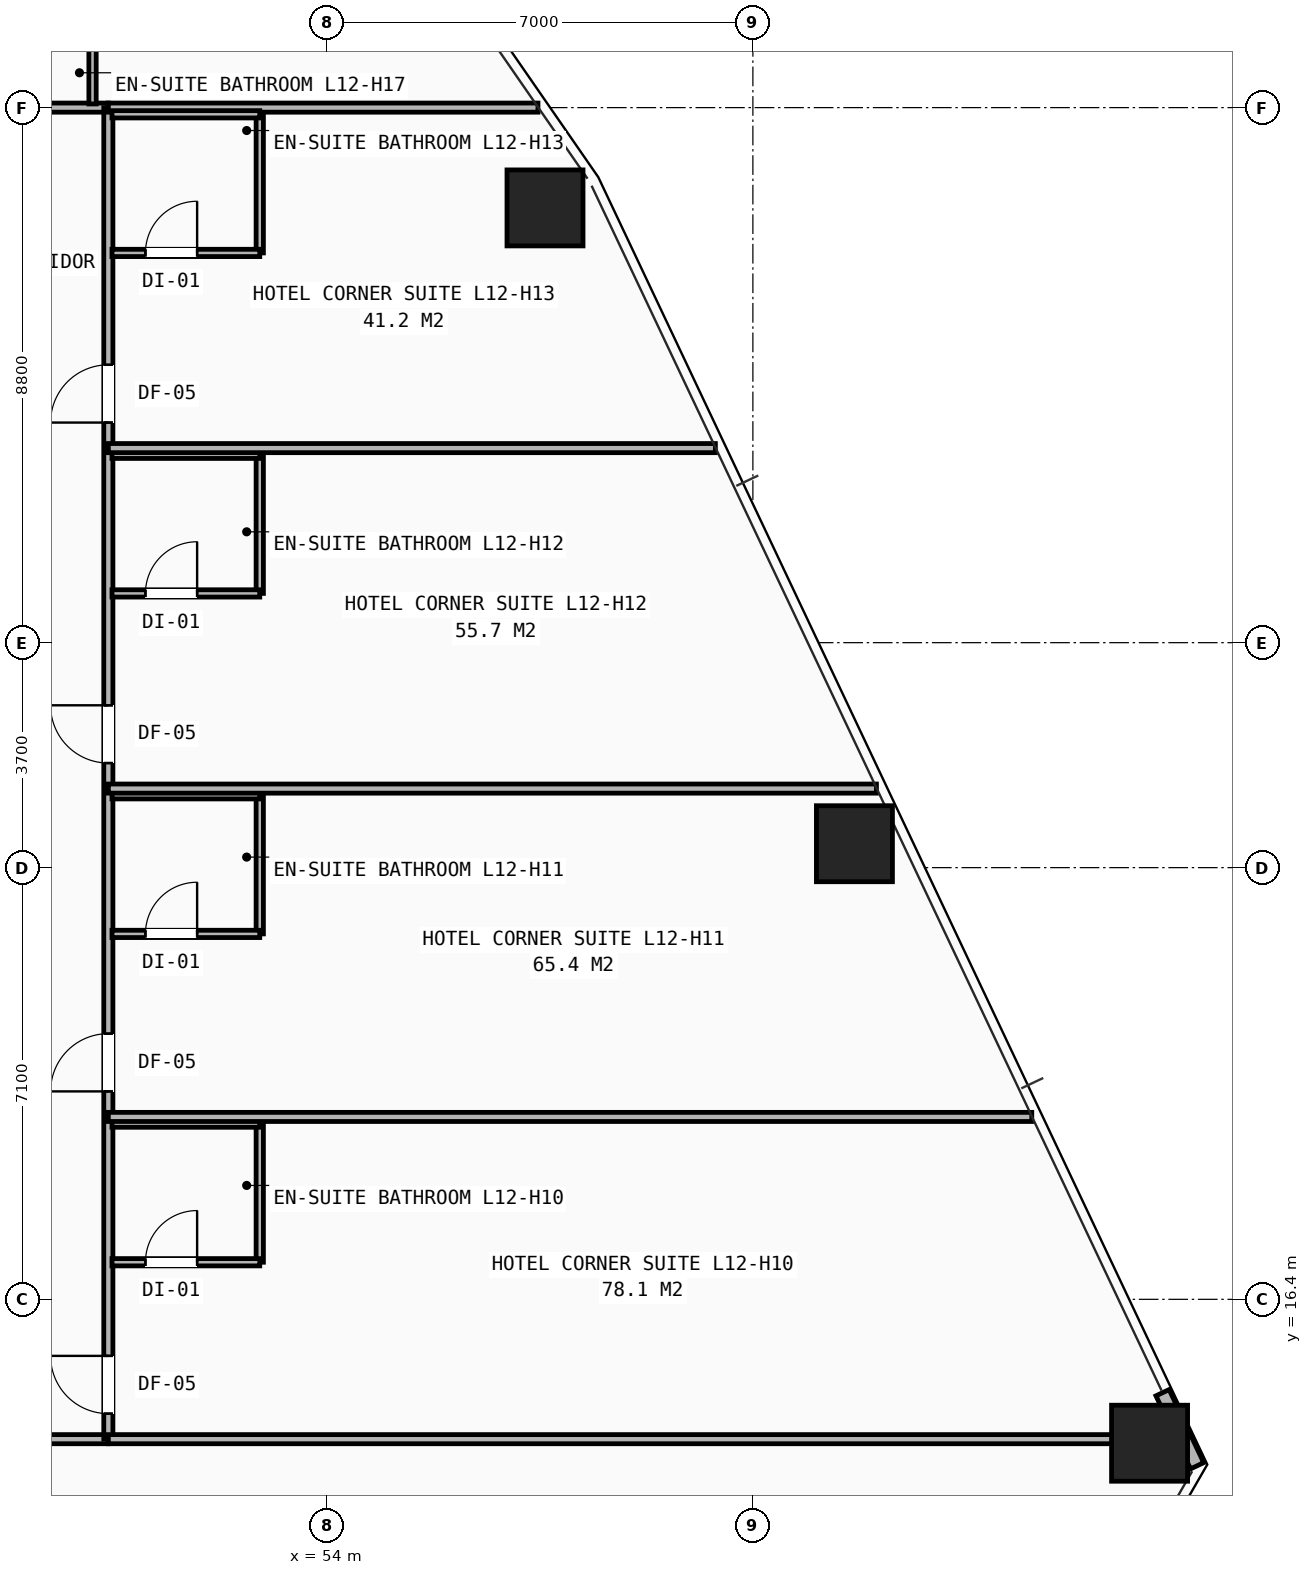
"""IFC4 building model, lengths in metres.
Left out: names, types, materials, properties, quantities, classifications, styles, units other than length and angle.
Written with IfcOpenShell. Run it as: python <this file> out.ifc"""

import sys

from ifc_helpers import new_model, si_unit, direction, frame, frame_2d, origin, origin_2d, place, context, subcontext, project, spatial, rectangle, hollow_rectangle, extrude, element, fill, save


model = new_model("IFC4")
c1 = context("Model", 3, precision=1e-05, world=origin(), true_north=direction((0.0, 1.0)))
c2 = subcontext(c1, "Body", "Model", "MODEL_VIEW")
j1 = project(units=[si_unit("LENGTHUNIT", "METRE"), si_unit("PLANEANGLEUNIT", "RADIAN")], contexts=[c1])
p1 = place(None, origin())
s1 = spatial("IfcSite", under=j1, at=p1, CompositionType="ELEMENT")
p2 = place(p1, origin())
s2 = spatial("IfcBuilding", under=s1, at=p2, CompositionType="ELEMENT")
p3 = place(p2, frame((0.0, 0.0, 46.4)))
s3 = spatial("IfcBuildingStorey", under=s2, at=p3, CompositionType="ELEMENT", Elevation=46.4)
for number, where, z_axis, x_axis in (
    (1, (67.524, 14.033, 0.0), (0.0, 0.0, 1.0), (1.0, 0.0, 0.0)),
    (2, (62.67, 23.893, 0.0), (0.0, 0.0, 1.0), (1.0, 0.0, 0.0)),
    (3, (57.581, 34.35, 0.0), (0.0, 0.0, 1.0), (1.0, 0.0, 0.0)),
):
    element("IfcColumn", number, at=place(p3, frame(where, z_axis=z_axis, x_axis=x_axis)), inside=s3, PredefinedType="COLUMN", context=c2, shape_type="SweptSolid", body=[
        extrude(hollow_rectangle(XDim=1.25, YDim=1.25, WallThickness=0.08, at=origin_2d()), origin(), (0.0, 0.0, 1.0), 3.2),
    ])
p4 = place(p3, frame((68.306, 13.662, 0.0), z_axis=(0.0, 0.0, 1.0), x_axis=(-0.427644283084, 0.903947104175, 0.0)))
e4 = element("IfcWall", 4, at=p4, inside=s3, PredefinedType="SHEAR", context=c2, shape_type="SweptSolid", body=[
    extrude(rectangle(XDim=1.33, YDim=0.24, at=frame_2d((0.665, 0.0))), origin(), (0.0, 0.0, 1.0), 2.263),
])
p5 = place(p3, frame((29.6, 14.1, 0.0), z_axis=(0.0, 0.0, 1.0), x_axis=(1.0, 0.0, 0.0)))
e5 = element("IfcWall", 5, at=p5, inside=s3, PredefinedType="PARTITIONING", context=c2, shape_type="SweptSolid", body=[
    extrude(rectangle(XDim=20.8, YDim=0.15, at=frame_2d((10.4, 0.0))), origin(), (0.0, 0.0, 1.0), 2.431),
])
p6 = place(p5, frame((0.57, 0.0, 0.0)))
e6 = element("IfcOpeningElement", 6, at=p6, cuts=e5, PredefinedType="OPENING", context=c2, shape_type="SweptSolid", body=[
    extrude(rectangle(XDim=0.95, YDim=2.1, at=frame_2d((0.475, 1.05))), frame((0.0, 0.085, 0.0), z_axis=(0.0, -1.0, 0.0), x_axis=(1.0, 0.0, 0.0)), (0.0, 0.0, 1.0), 0.17),
])
p7 = place(p5, frame((4.22, 0.0, 0.0)))
e7 = element("IfcOpeningElement", 7, at=p7, cuts=e5, PredefinedType="OPENING", context=c2, shape_type="SweptSolid", body=[
    extrude(rectangle(XDim=0.95, YDim=2.1, at=frame_2d((0.475, 1.05))), frame((0.0, 0.085, 0.0), z_axis=(0.0, -1.0, 0.0), x_axis=(1.0, 0.0, 0.0)), (0.0, 0.0, 1.0), 0.17),
])
p8 = place(p5, frame((8.42, 0.0, 0.0)))
e8 = element("IfcOpeningElement", 8, at=p8, cuts=e5, PredefinedType="OPENING", context=c2, shape_type="SweptSolid", body=[
    extrude(rectangle(XDim=0.95, YDim=2.1, at=frame_2d((0.475, 1.05))), frame((0.0, 0.085, 0.0), z_axis=(0.0, -1.0, 0.0), x_axis=(1.0, 0.0, 0.0)), (0.0, 0.0, 1.0), 0.17),
])
p9 = place(p5, frame((12.62, 0.0, 0.0)))
e9 = element("IfcOpeningElement", 9, at=p9, cuts=e5, PredefinedType="OPENING", context=c2, shape_type="SweptSolid", body=[
    extrude(rectangle(XDim=0.95, YDim=2.1, at=frame_2d((0.475, 1.05))), frame((0.0, 0.085, 0.0), z_axis=(0.0, -1.0, 0.0), x_axis=(1.0, 0.0, 0.0)), (0.0, 0.0, 1.0), 0.17),
])
p10 = place(p5, frame((17.02, 0.0, 0.0)))
e10 = element("IfcOpeningElement", 10, at=p10, cuts=e5, PredefinedType="OPENING", context=c2, shape_type="SweptSolid", body=[
    extrude(rectangle(XDim=0.95, YDim=2.1, at=frame_2d((0.475, 1.05))), frame((0.0, 0.085, 0.0), z_axis=(0.0, -1.0, 0.0), x_axis=(1.0, 0.0, 0.0)), (0.0, 0.0, 1.0), 0.17),
])
p11 = place(p3, frame((41.275, 36.0, 0.0), z_axis=(0.0, 0.0, 1.0), x_axis=(1.0, 0.0, 0.0)))
e11 = element("IfcWall", 11, at=p11, inside=s3, PredefinedType="PARTITIONING", context=c2, shape_type="SweptSolid", body=[
    extrude(rectangle(XDim=9.125, YDim=0.15, at=frame_2d((4.562, 0.0))), origin(), (0.0, 0.0, 1.0), 2.513),
])
p12 = place(p11, frame((0.2, 0.0, 0.0)))
e12 = element("IfcOpeningElement", 12, at=p12, cuts=e11, PredefinedType="OPENING", context=c2, shape_type="SweptSolid", body=[
    extrude(rectangle(XDim=0.95, YDim=2.1, at=frame_2d((0.475, 1.05))), frame((0.0, 0.085, 0.0), z_axis=(0.0, -1.0, 0.0), x_axis=(1.0, 0.0, 0.0)), (0.0, 0.0, 1.0), 0.17),
])
p13 = place(p11, frame((4.345, 0.0, 0.0)))
e13 = element("IfcOpeningElement", 13, at=p13, cuts=e11, PredefinedType="OPENING", context=c2, shape_type="SweptSolid", body=[
    extrude(rectangle(XDim=0.95, YDim=2.1, at=frame_2d((0.475, 1.05))), frame((0.0, 0.085, 0.0), z_axis=(0.0, -1.0, 0.0), x_axis=(1.0, 0.0, 0.0)), (0.0, 0.0, 1.0), 0.17),
])
p14 = place(p3, frame((50.4, 14.1, 0.0), z_axis=(0.0, 0.0, 1.0), x_axis=(0.0, 1.0, 0.0)))
e14 = element("IfcWall", 14, at=p14, inside=s3, PredefinedType="PARTITIONING", context=c2, shape_type="SweptSolid", body=[
    extrude(rectangle(XDim=21.9, YDim=0.15, at=frame_2d((10.95, 0.0))), origin(), (0.0, 0.0, 1.0), 2.431),
])
p15 = place(p14, frame((0.42, 0.0, 0.0)))
e15 = element("IfcOpeningElement", 15, at=p15, cuts=e14, PredefinedType="OPENING", context=c2, shape_type="SweptSolid", body=[
    extrude(rectangle(XDim=0.95, YDim=2.1, at=frame_2d((0.475, 1.05))), frame((0.0, 0.085, 0.0), z_axis=(0.0, -1.0, 0.0), x_axis=(1.0, 0.0, 0.0)), (0.0, 0.0, 1.0), 0.17),
])
p16 = place(p14, frame((5.72, 0.0, 0.0)))
e16 = element("IfcOpeningElement", 16, at=p16, cuts=e14, PredefinedType="OPENING", context=c2, shape_type="SweptSolid", body=[
    extrude(rectangle(XDim=0.95, YDim=2.1, at=frame_2d((0.475, 1.05))), frame((0.0, 0.085, 0.0), z_axis=(0.0, -1.0, 0.0), x_axis=(1.0, 0.0, 0.0)), (0.0, 0.0, 1.0), 0.17),
])
p17 = place(p14, frame((11.12, 0.0, 0.0)))
e17 = element("IfcOpeningElement", 17, at=p17, cuts=e14, PredefinedType="OPENING", context=c2, shape_type="SweptSolid", body=[
    extrude(rectangle(XDim=0.95, YDim=2.1, at=frame_2d((0.475, 1.05))), frame((0.0, 0.085, 0.0), z_axis=(0.0, -1.0, 0.0), x_axis=(1.0, 0.0, 0.0)), (0.0, 0.0, 1.0), 0.17),
])
p18 = place(p14, frame((16.72, 0.0, 0.0)))
e18 = element("IfcOpeningElement", 18, at=p18, cuts=e14, PredefinedType="OPENING", context=c2, shape_type="SweptSolid", body=[
    extrude(rectangle(XDim=0.95, YDim=2.1, at=frame_2d((0.475, 1.05))), frame((0.0, 0.085, 0.0), z_axis=(0.0, -1.0, 0.0), x_axis=(1.0, 0.0, 0.0)), (0.0, 0.0, 1.0), 0.17),
])
p19 = place(p3, frame((50.4, 14.1, 0.0), z_axis=(0.0, 0.0, 1.0), x_axis=(1.0, 0.0, 0.0)))
e19 = element("IfcWall", 19, at=p19, inside=s3, PredefinedType="PARTITIONING", context=c2, shape_type="SweptSolid", body=[
    extrude(rectangle(XDim=17.694, YDim=0.15, at=frame_2d((8.847, 0.0))), origin(), (0.0, 0.0, 1.0), 2.268),
])
p20 = place(p3, frame((50.4, 36.0, 0.0), z_axis=(0.0, 0.0, 1.0), x_axis=(1.0, 0.0, 0.0)))
e20 = element("IfcWall", 20, at=p20, inside=s3, PredefinedType="PARTITIONING", context=c2, shape_type="SweptSolid", body=[
    extrude(rectangle(XDim=7.065, YDim=0.15, at=frame_2d((3.533, 0.0))), origin(), (0.0, 0.0, 1.0), 2.268),
])
p21 = place(p3, frame((52.89, 17.01, 0.0), z_axis=(0.0, 0.0, 1.0), x_axis=(0.0, 1.0, 0.0)))
e21 = element("IfcWall", 21, at=p21, inside=s3, PredefinedType="PARTITIONING", context=c2, shape_type="SweptSolid", body=[
    extrude(rectangle(XDim=2.28, YDim=0.12, at=frame_2d((1.14, 0.0))), origin(), (0.0, 0.0, 1.0), 2.98),
])
p22 = place(p3, frame((50.46, 17.01, 0.0), z_axis=(0.0, 0.0, 1.0), x_axis=(1.0, 0.0, 0.0)))
e22 = element("IfcWall", 22, at=p22, inside=s3, PredefinedType="PARTITIONING", context=c2, shape_type="SweptSolid", body=[
    extrude(rectangle(XDim=2.43, YDim=0.12, at=frame_2d((1.215, 0.0))), origin(), (0.0, 0.0, 1.0), 2.98),
])
p23 = place(p22, frame((0.55, 0.0, 0.0)))
e23 = element("IfcOpeningElement", 23, at=p23, cuts=e22, PredefinedType="OPENING", context=c2, shape_type="SweptSolid", body=[
    extrude(rectangle(XDim=0.85, YDim=2.05, at=frame_2d((0.425, 1.025))), frame((0.0, 0.07, 0.0), z_axis=(0.0, -1.0, 0.0), x_axis=(1.0, 0.0, 0.0)), (0.0, 0.0, 1.0), 0.14),
])
p24 = place(p3, frame((50.46, 19.29, 0.0), z_axis=(0.0, 0.0, 1.0), x_axis=(1.0, 0.0, 0.0)))
e24 = element("IfcWall", 24, at=p24, inside=s3, PredefinedType="PARTITIONING", context=c2, shape_type="SweptSolid", body=[
    extrude(rectangle(XDim=2.43, YDim=0.12, at=frame_2d((1.215, 0.0))), origin(), (0.0, 0.0, 1.0), 2.98),
])
p25 = place(p3, frame((50.4, 19.4, 0.0), z_axis=(0.0, 0.0, 1.0), x_axis=(1.0, 0.0, 0.0)))
e25 = element("IfcWall", 25, at=p25, inside=s3, PredefinedType="PARTITIONING", context=c2, shape_type="SweptSolid", body=[
    extrude(rectangle(XDim=15.186, YDim=0.15, at=frame_2d((7.593, 0.0))), origin(), (0.0, 0.0, 1.0), 2.268),
])
p26 = place(p3, frame((52.89, 22.41, 0.0), z_axis=(0.0, 0.0, 1.0), x_axis=(0.0, 1.0, 0.0)))
e26 = element("IfcWall", 26, at=p26, inside=s3, PredefinedType="PARTITIONING", context=c2, shape_type="SweptSolid", body=[
    extrude(rectangle(XDim=2.28, YDim=0.12, at=frame_2d((1.14, 0.0))), origin(), (0.0, 0.0, 1.0), 2.98),
])
p27 = place(p3, frame((50.46, 22.41, 0.0), z_axis=(0.0, 0.0, 1.0), x_axis=(1.0, 0.0, 0.0)))
e27 = element("IfcWall", 27, at=p27, inside=s3, PredefinedType="PARTITIONING", context=c2, shape_type="SweptSolid", body=[
    extrude(rectangle(XDim=2.43, YDim=0.12, at=frame_2d((1.215, 0.0))), origin(), (0.0, 0.0, 1.0), 2.98),
])
p28 = place(p27, frame((0.55, 0.0, 0.0)))
e28 = element("IfcOpeningElement", 28, at=p28, cuts=e27, PredefinedType="OPENING", context=c2, shape_type="SweptSolid", body=[
    extrude(rectangle(XDim=0.85, YDim=2.05, at=frame_2d((0.425, 1.025))), frame((0.0, 0.07, 0.0), z_axis=(0.0, -1.0, 0.0), x_axis=(1.0, 0.0, 0.0)), (0.0, 0.0, 1.0), 0.14),
])
p29 = place(p3, frame((50.46, 24.69, 0.0), z_axis=(0.0, 0.0, 1.0), x_axis=(1.0, 0.0, 0.0)))
e29 = element("IfcWall", 29, at=p29, inside=s3, PredefinedType="PARTITIONING", context=c2, shape_type="SweptSolid", body=[
    extrude(rectangle(XDim=2.43, YDim=0.12, at=frame_2d((1.215, 0.0))), origin(), (0.0, 0.0, 1.0), 2.98),
])
p30 = place(p3, frame((50.4, 24.8, 0.0), z_axis=(0.0, 0.0, 1.0), x_axis=(1.0, 0.0, 0.0)))
e30 = element("IfcWall", 30, at=p30, inside=s3, PredefinedType="PARTITIONING", context=c2, shape_type="SweptSolid", body=[
    extrude(rectangle(XDim=12.632, YDim=0.15, at=frame_2d((6.316, 0.0))), origin(), (0.0, 0.0, 1.0), 2.268),
])
p31 = place(p3, frame((52.89, 28.01, 0.0), z_axis=(0.0, 0.0, 1.0), x_axis=(0.0, 1.0, 0.0)))
e31 = element("IfcWall", 31, at=p31, inside=s3, PredefinedType="PARTITIONING", context=c2, shape_type="SweptSolid", body=[
    extrude(rectangle(XDim=2.28, YDim=0.12, at=frame_2d((1.14, 0.0))), origin(), (0.0, 0.0, 1.0), 2.98),
])
p32 = place(p3, frame((50.46, 28.01, 0.0), z_axis=(0.0, 0.0, 1.0), x_axis=(1.0, 0.0, 0.0)))
e32 = element("IfcWall", 32, at=p32, inside=s3, PredefinedType="PARTITIONING", context=c2, shape_type="SweptSolid", body=[
    extrude(rectangle(XDim=2.43, YDim=0.12, at=frame_2d((1.215, 0.0))), origin(), (0.0, 0.0, 1.0), 2.98),
])
p33 = place(p32, frame((0.55, 0.0, 0.0)))
e33 = element("IfcOpeningElement", 33, at=p33, cuts=e32, PredefinedType="OPENING", context=c2, shape_type="SweptSolid", body=[
    extrude(rectangle(XDim=0.85, YDim=2.05, at=frame_2d((0.425, 1.025))), frame((0.0, 0.07, 0.0), z_axis=(0.0, -1.0, 0.0), x_axis=(1.0, 0.0, 0.0)), (0.0, 0.0, 1.0), 0.14),
])
p34 = place(p3, frame((50.46, 30.29, 0.0), z_axis=(0.0, 0.0, 1.0), x_axis=(1.0, 0.0, 0.0)))
e34 = element("IfcWall", 34, at=p34, inside=s3, PredefinedType="PARTITIONING", context=c2, shape_type="SweptSolid", body=[
    extrude(rectangle(XDim=2.43, YDim=0.12, at=frame_2d((1.215, 0.0))), origin(), (0.0, 0.0, 1.0), 2.98),
])
p35 = place(p3, frame((50.4, 30.4, 0.0), z_axis=(0.0, 0.0, 1.0), x_axis=(1.0, 0.0, 0.0)))
e35 = element("IfcWall", 35, at=p35, inside=s3, PredefinedType="PARTITIONING", context=c2, shape_type="SweptSolid", body=[
    extrude(rectangle(XDim=9.983, YDim=0.15, at=frame_2d((4.992, 0.0))), origin(), (0.0, 0.0, 1.0), 2.268),
])
p36 = place(p3, frame((52.89, 33.61, 0.0), z_axis=(0.0, 0.0, 1.0), x_axis=(0.0, 1.0, 0.0)))
e36 = element("IfcWall", 36, at=p36, inside=s3, PredefinedType="PARTITIONING", context=c2, shape_type="SweptSolid", body=[
    extrude(rectangle(XDim=2.28, YDim=0.12, at=frame_2d((1.14, 0.0))), origin(), (0.0, 0.0, 1.0), 2.98),
])
p37 = place(p3, frame((50.46, 33.61, 0.0), z_axis=(0.0, 0.0, 1.0), x_axis=(1.0, 0.0, 0.0)))
e37 = element("IfcWall", 37, at=p37, inside=s3, PredefinedType="PARTITIONING", context=c2, shape_type="SweptSolid", body=[
    extrude(rectangle(XDim=2.43, YDim=0.12, at=frame_2d((1.215, 0.0))), origin(), (0.0, 0.0, 1.0), 2.513),
])
p38 = place(p37, frame((0.55, 0.0, 0.0)))
e38 = element("IfcOpeningElement", 38, at=p38, cuts=e37, PredefinedType="OPENING", context=c2, shape_type="SweptSolid", body=[
    extrude(rectangle(XDim=0.85, YDim=2.05, at=frame_2d((0.425, 1.025))), frame((0.0, 0.07, 0.0), z_axis=(0.0, -1.0, 0.0), x_axis=(1.0, 0.0, 0.0)), (0.0, 0.0, 1.0), 0.14),
])
for number, where, z_axis, x_axis in (
    (39, (50.46, 35.89, 0.0), (0.0, 0.0, 1.0), (1.0, 0.0, 0.0)),
    (40, (50.14, 36.06, 0.0), (0.0, 0.0, 1.0), (0.0, 1.0, 0.0)),
):
    element("IfcWall", number, at=place(p3, frame(where, z_axis=z_axis, x_axis=x_axis)), inside=s3, PredefinedType="PARTITIONING", context=c2, shape_type="SweptSolid", body=[
        extrude(rectangle(XDim=2.43, YDim=0.12, at=frame_2d((1.215, 0.0))), origin(), (0.0, 0.0, 1.0), 2.513),
    ])
p39 = place(p15, origin())
e41 = element("IfcDoor", 41, at=p39, inside=s3, OperationType="SINGLE_SWING_RIGHT", PredefinedType="DOOR", context=c2, shape_type="SweptSolid", body=[
    extrude(rectangle(XDim=0.95, YDim=2.1, at=frame_2d((0.475, 1.05))), frame((0.0, 0.025, 0.0), z_axis=(0.0, -1.0, 0.0), x_axis=(1.0, 0.0, 0.0)), (0.0, 0.0, 1.0), 0.05),
])
fill(e15, e41)
p40 = place(p23, origin())
e42 = element("IfcDoor", 42, at=p40, inside=s3, OperationType="SINGLE_SWING_RIGHT", PredefinedType="DOOR", context=c2, shape_type="SweptSolid", body=[
    extrude(rectangle(XDim=0.85, YDim=2.05, at=frame_2d((0.425, 1.025))), frame((0.0, 0.025, 0.0), z_axis=(0.0, -1.0, 0.0), x_axis=(1.0, 0.0, 0.0)), (0.0, 0.0, 1.0), 0.05),
])
fill(e23, e42)
p41 = place(p16, origin())
e43 = element("IfcDoor", 43, at=p41, inside=s3, OperationType="SINGLE_SWING_LEFT", PredefinedType="DOOR", context=c2, shape_type="SweptSolid", body=[
    extrude(rectangle(XDim=0.95, YDim=2.1, at=frame_2d((0.475, 1.05))), frame((0.0, 0.025, 0.0), z_axis=(0.0, -1.0, 0.0), x_axis=(1.0, 0.0, 0.0)), (0.0, 0.0, 1.0), 0.05),
])
fill(e16, e43)
p42 = place(p28, origin())
e44 = element("IfcDoor", 44, at=p42, inside=s3, OperationType="SINGLE_SWING_RIGHT", PredefinedType="DOOR", context=c2, shape_type="SweptSolid", body=[
    extrude(rectangle(XDim=0.85, YDim=2.05, at=frame_2d((0.425, 1.025))), frame((0.0, 0.025, 0.0), z_axis=(0.0, -1.0, 0.0), x_axis=(1.0, 0.0, 0.0)), (0.0, 0.0, 1.0), 0.05),
])
fill(e28, e44)
p43 = place(p17, origin())
e45 = element("IfcDoor", 45, at=p43, inside=s3, OperationType="SINGLE_SWING_RIGHT", PredefinedType="DOOR", context=c2, shape_type="SweptSolid", body=[
    extrude(rectangle(XDim=0.95, YDim=2.1, at=frame_2d((0.475, 1.05))), frame((0.0, 0.025, 0.0), z_axis=(0.0, -1.0, 0.0), x_axis=(1.0, 0.0, 0.0)), (0.0, 0.0, 1.0), 0.05),
])
fill(e17, e45)
p44 = place(p33, origin())
e46 = element("IfcDoor", 46, at=p44, inside=s3, OperationType="SINGLE_SWING_RIGHT", PredefinedType="DOOR", context=c2, shape_type="SweptSolid", body=[
    extrude(rectangle(XDim=0.85, YDim=2.05, at=frame_2d((0.425, 1.025))), frame((0.0, 0.025, 0.0), z_axis=(0.0, -1.0, 0.0), x_axis=(1.0, 0.0, 0.0)), (0.0, 0.0, 1.0), 0.05),
])
fill(e33, e46)
p45 = place(p18, origin())
e47 = element("IfcDoor", 47, at=p45, inside=s3, OperationType="SINGLE_SWING_LEFT", PredefinedType="DOOR", context=c2, shape_type="SweptSolid", body=[
    extrude(rectangle(XDim=0.95, YDim=2.1, at=frame_2d((0.475, 1.05))), frame((0.0, 0.025, 0.0), z_axis=(0.0, -1.0, 0.0), x_axis=(1.0, 0.0, 0.0)), (0.0, 0.0, 1.0), 0.05),
])
fill(e18, e47)
p46 = place(p38, origin())
e48 = element("IfcDoor", 48, at=p46, inside=s3, OperationType="SINGLE_SWING_RIGHT", PredefinedType="DOOR", context=c2, shape_type="SweptSolid", body=[
    extrude(rectangle(XDim=0.85, YDim=2.05, at=frame_2d((0.425, 1.025))), frame((0.0, 0.025, 0.0), z_axis=(0.0, -1.0, 0.0), x_axis=(1.0, 0.0, 0.0)), (0.0, 0.0, 1.0), 0.05),
])
fill(e38, e48)
save(model, sys.argv[1])
